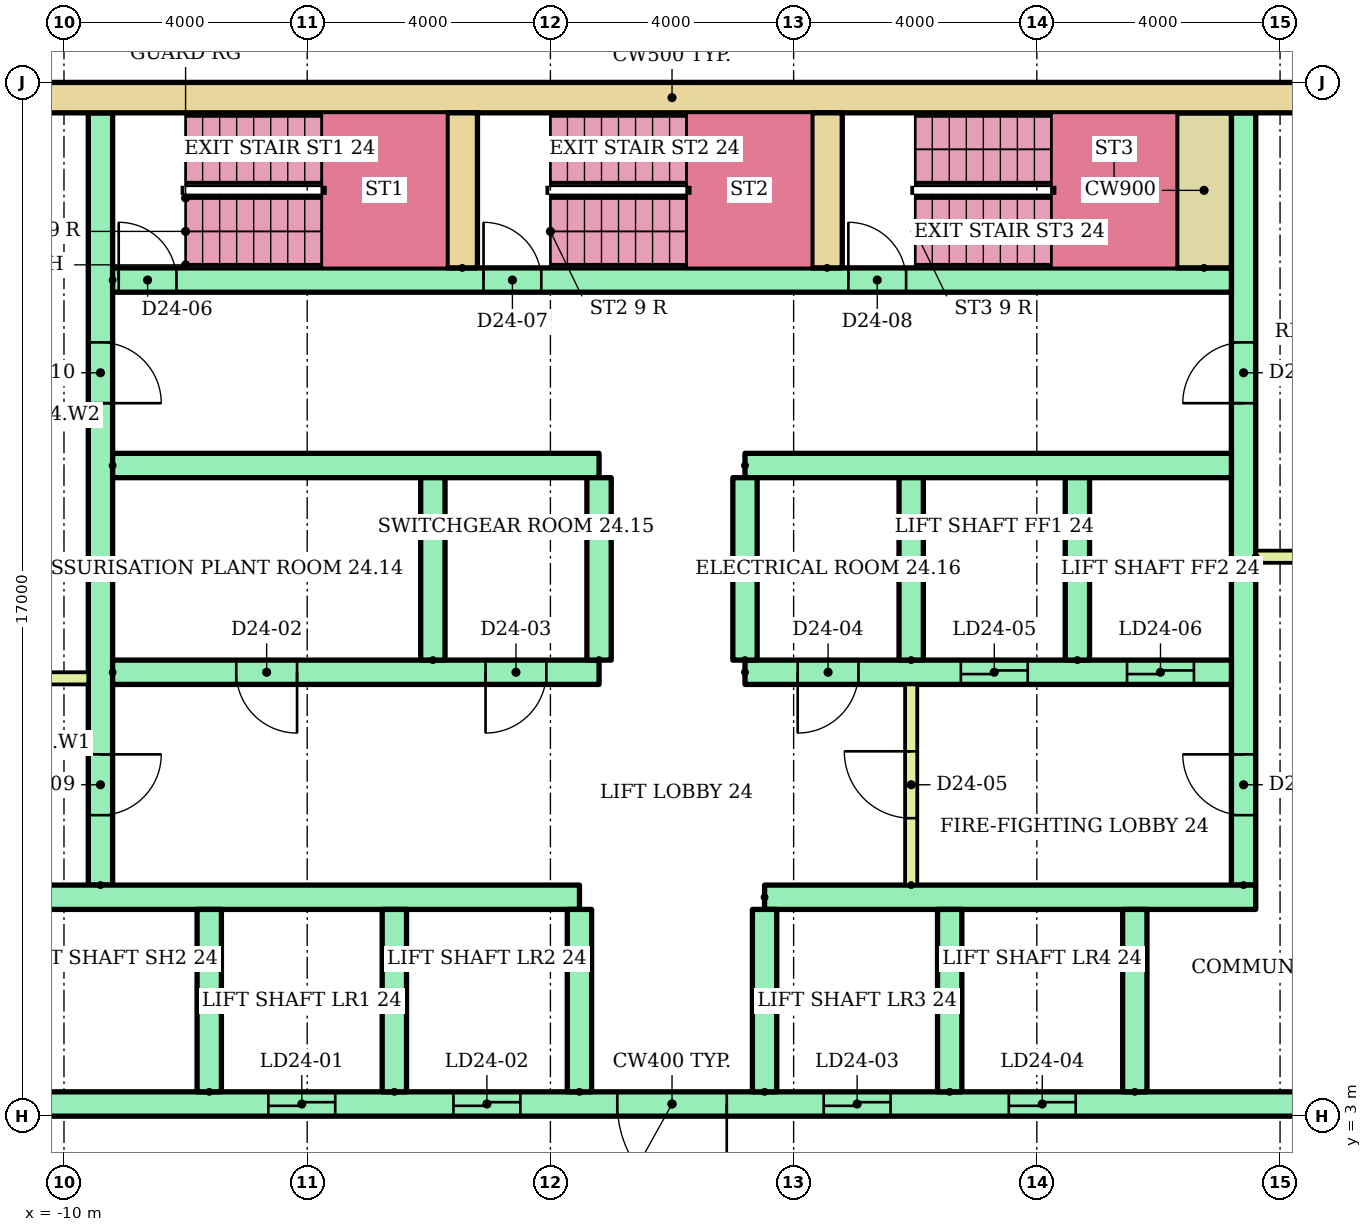
"""IFC4 building model, lengths in metres.
Left out: names, types, materials, properties, quantities, classifications, styles, units other than length and angle.
Written with IfcOpenShell. Run it as: python <this file> out.ifc"""

import sys

from ifc_helpers import new_model, si_unit, direction, frame, frame_2d, origin, place, context, subcontext, project, spatial, rectangle, extrude, element, fill, save


model = new_model("IFC4")
c1 = context("Model", 3, precision=1e-05, world=origin(), true_north=direction((0.0, 1.0)))
c2 = subcontext(c1, "Body", "Model", "MODEL_VIEW")
j1 = project(units=[si_unit("LENGTHUNIT", "METRE"), si_unit("PLANEANGLEUNIT", "RADIAN")], contexts=[c1])
p1 = place(None, origin())
s1 = spatial("IfcSite", under=j1, at=p1, CompositionType="ELEMENT")
p2 = place(p1, origin())
s2 = spatial("IfcBuilding", under=s1, at=p2, CompositionType="ELEMENT")
p3 = place(p2, frame((0.0, 0.0, 93.5)))
s3 = spatial("IfcBuildingStorey", under=s2, at=p3, CompositionType="ELEMENT", Elevation=93.5)
p4 = place(p3, frame((-13.5, 19.75, 0.0)))
e1 = element("IfcWall", 1, at=p4, inside=s3, PredefinedType="SHEAR", context=c2, shape_type="SweptSolid", body=[
    extrude(rectangle(XDim=27.0, YDim=0.5, at=frame_2d((13.5, 0.0))), origin(), (0.0, 0.0, 1.0), 2.92),
])
p5 = place(p3, frame((-9.4, 6.8, 0.0), z_axis=(0.0, 0.0, 1.0), x_axis=(0.0, 1.0, 0.0)))
e2 = element("IfcWall", 2, at=p5, inside=s3, PredefinedType="SHEAR", context=c2, shape_type="SweptSolid", body=[
    extrude(rectangle(XDim=12.7, YDim=0.4, at=frame_2d((6.35, 0.0))), origin(), (0.0, 0.0, 1.0), 2.92),
])
p6 = place(p5, frame((1.15, 0.0, 0.0)))
e3 = element("IfcOpeningElement", 3, at=p6, cuts=e2, PredefinedType="OPENING", context=c2, shape_type="SweptSolid", body=[
    extrude(rectangle(XDim=1.0, YDim=2.1, at=frame_2d((0.5, 1.05))), frame((0.0, 0.21, 0.0), z_axis=(0.0, -1.0, 0.0), x_axis=(1.0, 0.0, 0.0)), (0.0, 0.0, 1.0), 0.42),
])
p7 = place(p5, frame((7.925, 0.0, 0.0)))
e4 = element("IfcOpeningElement", 4, at=p7, cuts=e2, PredefinedType="OPENING", context=c2, shape_type="SweptSolid", body=[
    extrude(rectangle(XDim=1.0, YDim=2.1, at=frame_2d((0.5, 1.05))), frame((0.0, 0.21, 0.0), z_axis=(0.0, -1.0, 0.0), x_axis=(1.0, 0.0, 0.0)), (0.0, 0.0, 1.0), 0.42),
])
p8 = place(p3, frame((9.4, 6.8, 0.0), z_axis=(0.0, 0.0, 1.0), x_axis=(0.0, 1.0, 0.0)))
e5 = element("IfcWall", 5, at=p8, inside=s3, PredefinedType="SHEAR", context=c2, shape_type="SweptSolid", body=[
    extrude(rectangle(XDim=12.7, YDim=0.4, at=frame_2d((6.35, 0.0))), origin(), (0.0, 0.0, 1.0), 2.92),
])
p9 = place(p8, frame((1.15, 0.0, 0.0)))
e6 = element("IfcOpeningElement", 6, at=p9, cuts=e5, PredefinedType="OPENING", context=c2, shape_type="SweptSolid", body=[
    extrude(rectangle(XDim=1.0, YDim=2.1, at=frame_2d((0.5, 1.05))), frame((0.0, 0.21, 0.0), z_axis=(0.0, -1.0, 0.0), x_axis=(1.0, 0.0, 0.0)), (0.0, 0.0, 1.0), 0.42),
])
p10 = place(p8, frame((7.925, 0.0, 0.0)))
e7 = element("IfcOpeningElement", 7, at=p10, cuts=e5, PredefinedType="OPENING", context=c2, shape_type="SweptSolid", body=[
    extrude(rectangle(XDim=1.0, YDim=2.1, at=frame_2d((0.5, 1.05))), frame((0.0, 0.21, 0.0), z_axis=(0.0, -1.0, 0.0), x_axis=(1.0, 0.0, 0.0)), (0.0, 0.0, 1.0), 0.42),
])
p11 = place(p3, frame((-13.5, 3.2, 0.0)))
e8 = element("IfcWall", 8, at=p11, inside=s3, PredefinedType="SHEAR", context=c2, shape_type="SweptSolid", body=[
    extrude(rectangle(XDim=27.0, YDim=0.4, at=frame_2d((13.5, 0.0))), origin(), (0.0, 0.0, 1.0), 2.92),
])
p12 = place(p11, frame((6.861, 0.0, 0.0)))
e9 = element("IfcOpeningElement", 9, at=p12, cuts=e8, PredefinedType="OPENING", context=c2, shape_type="SweptSolid", body=[
    extrude(rectangle(XDim=1.1, YDim=2.1, at=frame_2d((0.55, 1.05))), frame((0.0, 0.21, 0.0), z_axis=(0.0, -1.0, 0.0), x_axis=(1.0, 0.0, 0.0)), (0.0, 0.0, 1.0), 0.42),
])
p13 = place(p11, frame((9.906, 0.0, 0.0)))
e10 = element("IfcOpeningElement", 10, at=p13, cuts=e8, PredefinedType="OPENING", context=c2, shape_type="SweptSolid", body=[
    extrude(rectangle(XDim=1.1, YDim=2.1, at=frame_2d((0.55, 1.05))), frame((0.0, 0.21, 0.0), z_axis=(0.0, -1.0, 0.0), x_axis=(1.0, 0.0, 0.0)), (0.0, 0.0, 1.0), 0.42),
])
p14 = place(p11, frame((15.994, 0.0, 0.0)))
e11 = element("IfcOpeningElement", 11, at=p14, cuts=e8, PredefinedType="OPENING", context=c2, shape_type="SweptSolid", body=[
    extrude(rectangle(XDim=1.1, YDim=2.1, at=frame_2d((0.55, 1.05))), frame((0.0, 0.21, 0.0), z_axis=(0.0, -1.0, 0.0), x_axis=(1.0, 0.0, 0.0)), (0.0, 0.0, 1.0), 0.42),
])
p15 = place(p11, frame((19.039, 0.0, 0.0)))
e12 = element("IfcOpeningElement", 12, at=p15, cuts=e8, PredefinedType="OPENING", context=c2, shape_type="SweptSolid", body=[
    extrude(rectangle(XDim=1.1, YDim=2.1, at=frame_2d((0.55, 1.05))), frame((0.0, 0.21, 0.0), z_axis=(0.0, -1.0, 0.0), x_axis=(1.0, 0.0, 0.0)), (0.0, 0.0, 1.0), 0.42),
])
p16 = place(p11, frame((12.6, 0.0, 0.0)))
e13 = element("IfcOpeningElement", 13, at=p16, cuts=e8, PredefinedType="OPENING", context=c2, shape_type="SweptSolid", body=[
    extrude(rectangle(XDim=1.8, YDim=2.1, at=frame_2d((0.9, 1.05))), frame((0.0, 0.21, 0.0), z_axis=(0.0, -1.0, 0.0), x_axis=(1.0, 0.0, 0.0)), (0.0, 0.0, 1.0), 0.42),
])
p17 = place(p3, frame((-13.5, 6.6, 0.0)))
e14 = element("IfcWall", 14, at=p17, inside=s3, PredefinedType="SHEAR", context=c2, shape_type="SweptSolid", body=[
    extrude(rectangle(XDim=11.978, YDim=0.4, at=frame_2d((5.989, 0.0))), origin(), (0.0, 0.0, 1.0), 2.92),
])
p18 = place(p3, frame((1.522, 6.6, 0.0)))
e15 = element("IfcWall", 15, at=p18, inside=s3, PredefinedType="SHEAR", context=c2, shape_type="SweptSolid", body=[
    extrude(rectangle(XDim=8.078, YDim=0.4, at=frame_2d((4.039, 0.0))), origin(), (0.0, 0.0, 1.0), 2.92),
])
for number, where, z_axis, x_axis in (
    (16, (-7.611, 3.4, 0.0), (0.0, 0.0, 1.0), (0.0, 1.0, 0.0)),
    (17, (-4.567, 3.4, 0.0), (0.0, 0.0, 1.0), (0.0, 1.0, 0.0)),
    (18, (-1.522, 3.4, 0.0), (0.0, 0.0, 1.0), (0.0, 1.0, 0.0)),
    (19, (1.522, 3.4, 0.0), (0.0, 0.0, 1.0), (0.0, 1.0, 0.0)),
    (20, (4.567, 3.4, 0.0), (0.0, 0.0, 1.0), (0.0, 1.0, 0.0)),
    (21, (7.611, 3.4, 0.0), (0.0, 0.0, 1.0), (0.0, 1.0, 0.0)),
):
    element("IfcWall", number, at=place(p3, frame(where, z_axis=z_axis, x_axis=x_axis)), inside=s3, PredefinedType="SHEAR", context=c2, shape_type="SweptSolid", body=[
        extrude(rectangle(XDim=3.0, YDim=0.4, at=frame_2d((1.5, 0.0))), origin(), (0.0, 0.0, 1.0), 2.92),
    ])
p19 = place(p3, frame((-9.2, 10.3, 0.0)))
e22 = element("IfcWall", 22, at=p19, inside=s3, PredefinedType="SHEAR", context=c2, shape_type="SweptSolid", body=[
    extrude(rectangle(XDim=8.0, YDim=0.4, at=frame_2d((4.0, 0.0))), origin(), (0.0, 0.0, 1.0), 2.92),
])
p20 = place(p19, frame((2.033, 0.0, 0.0)))
e23 = element("IfcOpeningElement", 23, at=p20, cuts=e22, PredefinedType="OPENING", context=c2, shape_type="SweptSolid", body=[
    extrude(rectangle(XDim=1.0, YDim=2.1, at=frame_2d((0.5, 1.05))), frame((0.0, 0.21, 0.0), z_axis=(0.0, -1.0, 0.0), x_axis=(1.0, 0.0, 0.0)), (0.0, 0.0, 1.0), 0.42),
])
p21 = place(p19, frame((6.133, 0.0, 0.0)))
e24 = element("IfcOpeningElement", 24, at=p21, cuts=e22, PredefinedType="OPENING", context=c2, shape_type="SweptSolid", body=[
    extrude(rectangle(XDim=1.0, YDim=2.1, at=frame_2d((0.5, 1.05))), frame((0.0, 0.21, 0.0), z_axis=(0.0, -1.0, 0.0), x_axis=(1.0, 0.0, 0.0)), (0.0, 0.0, 1.0), 0.42),
])
p22 = place(p3, frame((-9.2, 13.7, 0.0)))
e25 = element("IfcWall", 25, at=p22, inside=s3, PredefinedType="SHEAR", context=c2, shape_type="SweptSolid", body=[
    extrude(rectangle(XDim=8.0, YDim=0.4, at=frame_2d((4.0, 0.0))), origin(), (0.0, 0.0, 1.0), 2.92),
])
p23 = place(p3, frame((1.2, 10.3, 0.0)))
e26 = element("IfcWall", 26, at=p23, inside=s3, PredefinedType="SHEAR", context=c2, shape_type="SweptSolid", body=[
    extrude(rectangle(XDim=8.0, YDim=0.4, at=frame_2d((4.0, 0.0))), origin(), (0.0, 0.0, 1.0), 2.92),
])
p24 = place(p23, frame((3.55, 0.0, 0.0)))
e27 = element("IfcOpeningElement", 27, at=p24, cuts=e26, PredefinedType="OPENING", context=c2, shape_type="SweptSolid", body=[
    extrude(rectangle(XDim=1.1, YDim=2.1, at=frame_2d((0.55, 1.05))), frame((0.0, 0.21, 0.0), z_axis=(0.0, -1.0, 0.0), x_axis=(1.0, 0.0, 0.0)), (0.0, 0.0, 1.0), 0.42),
])
p25 = place(p23, frame((6.283, 0.0, 0.0)))
e28 = element("IfcOpeningElement", 28, at=p25, cuts=e26, PredefinedType="OPENING", context=c2, shape_type="SweptSolid", body=[
    extrude(rectangle(XDim=1.1, YDim=2.1, at=frame_2d((0.55, 1.05))), frame((0.0, 0.21, 0.0), z_axis=(0.0, -1.0, 0.0), x_axis=(1.0, 0.0, 0.0)), (0.0, 0.0, 1.0), 0.42),
])
p26 = place(p23, frame((0.867, 0.0, 0.0)))
e29 = element("IfcOpeningElement", 29, at=p26, cuts=e26, PredefinedType="OPENING", context=c2, shape_type="SweptSolid", body=[
    extrude(rectangle(XDim=1.0, YDim=2.1, at=frame_2d((0.5, 1.05))), frame((0.0, 0.21, 0.0), z_axis=(0.0, -1.0, 0.0), x_axis=(1.0, 0.0, 0.0)), (0.0, 0.0, 1.0), 0.42),
])
p27 = place(p3, frame((1.2, 13.7, 0.0)))
e30 = element("IfcWall", 30, at=p27, inside=s3, PredefinedType="SHEAR", context=c2, shape_type="SweptSolid", body=[
    extrude(rectangle(XDim=8.0, YDim=0.4, at=frame_2d((4.0, 0.0))), origin(), (0.0, 0.0, 1.0), 2.92),
])
for number, where, z_axis, x_axis in (
    (31, (-3.933, 10.5, 0.0), (0.0, 0.0, 1.0), (0.0, 1.0, 0.0)),
    (32, (-1.2, 10.5, 0.0), (0.0, 0.0, 1.0), (0.0, 1.0, 0.0)),
    (33, (1.2, 10.5, 0.0), (0.0, 0.0, 1.0), (0.0, 1.0, 0.0)),
    (34, (3.933, 10.5, 0.0), (0.0, 0.0, 1.0), (0.0, 1.0, 0.0)),
    (35, (6.667, 10.5, 0.0), (0.0, 0.0, 1.0), (0.0, 1.0, 0.0)),
):
    element("IfcWall", number, at=place(p3, frame(where, z_axis=z_axis, x_axis=x_axis)), inside=s3, PredefinedType="SHEAR", context=c2, shape_type="SweptSolid", body=[
        extrude(rectangle(XDim=3.0, YDim=0.4, at=frame_2d((1.5, 0.0))), origin(), (0.0, 0.0, 1.0), 2.92),
    ])
p28 = place(p3, frame((3.933, 6.8, 0.0), z_axis=(0.0, 0.0, 1.0), x_axis=(0.0, 1.0, 0.0)))
e36 = element("IfcWall", 36, at=p28, inside=s3, PredefinedType="PARTITIONING", context=c2, shape_type="SweptSolid", body=[
    extrude(rectangle(XDim=3.3, YDim=0.2, at=frame_2d((1.65, 0.0))), origin(), (0.0, 0.0, 1.0), 2.92),
])
p29 = place(p28, frame((1.1, 0.0, 0.0)))
e37 = element("IfcOpeningElement", 37, at=p29, cuts=e36, PredefinedType="OPENING", context=c2, shape_type="SweptSolid", body=[
    extrude(rectangle(XDim=1.1, YDim=2.1, at=frame_2d((0.55, 1.05))), frame((0.0, 0.11, 0.0), z_axis=(0.0, -1.0, 0.0), x_axis=(1.0, 0.0, 0.0)), (0.0, 0.0, 1.0), 0.22),
])
p30 = place(p3, frame((-9.2, 16.75, 0.0)))
e38 = element("IfcWall", 38, at=p30, inside=s3, PredefinedType="SHEAR", context=c2, shape_type="SweptSolid", body=[
    extrude(rectangle(XDim=18.4, YDim=0.4, at=frame_2d((9.2, 0.0))), origin(), (0.0, 0.0, 1.0), 2.92),
])
p31 = place(p30, frame((0.1, 0.0, 0.0)))
e39 = element("IfcOpeningElement", 39, at=p31, cuts=e38, PredefinedType="OPENING", context=c2, shape_type="SweptSolid", body=[
    extrude(rectangle(XDim=0.95, YDim=2.1, at=frame_2d((0.475, 1.05))), frame((0.0, 0.21, 0.0), z_axis=(0.0, -1.0, 0.0), x_axis=(1.0, 0.0, 0.0)), (0.0, 0.0, 1.0), 0.42),
])
p32 = place(p30, frame((6.1, 0.0, 0.0)))
e40 = element("IfcOpeningElement", 40, at=p32, cuts=e38, PredefinedType="OPENING", context=c2, shape_type="SweptSolid", body=[
    extrude(rectangle(XDim=0.95, YDim=2.1, at=frame_2d((0.475, 1.05))), frame((0.0, 0.21, 0.0), z_axis=(0.0, -1.0, 0.0), x_axis=(1.0, 0.0, 0.0)), (0.0, 0.0, 1.0), 0.42),
])
p33 = place(p30, frame((12.1, 0.0, 0.0)))
e41 = element("IfcOpeningElement", 41, at=p33, cuts=e38, PredefinedType="OPENING", context=c2, shape_type="SweptSolid", body=[
    extrude(rectangle(XDim=0.95, YDim=2.1, at=frame_2d((0.475, 1.05))), frame((0.0, 0.21, 0.0), z_axis=(0.0, -1.0, 0.0), x_axis=(1.0, 0.0, 0.0)), (0.0, 0.0, 1.0), 0.42),
])
for number, where, z_axis, x_axis in (
    (42, (-3.45, 16.95, 0.0), (0.0, 0.0, 1.0), (0.0, 1.0, 0.0)),
    (43, (2.55, 16.95, 0.0), (0.0, 0.0, 1.0), (0.0, 1.0, 0.0)),
):
    element("IfcWall", number, at=place(p3, frame(where, z_axis=z_axis, x_axis=x_axis)), inside=s3, PredefinedType="SHEAR", context=c2, shape_type="SweptSolid", body=[
        extrude(rectangle(XDim=2.55, YDim=0.5, at=frame_2d((1.275, 0.0))), origin(), (0.0, 0.0, 1.0), 2.92),
    ])
p34 = place(p3, frame((8.75, 16.95, 0.0), z_axis=(0.0, 0.0, 1.0), x_axis=(0.0, 1.0, 0.0)))
e44 = element("IfcWall", 44, at=p34, inside=s3, PredefinedType="SHEAR", context=c2, shape_type="SweptSolid", body=[
    extrude(rectangle(XDim=2.55, YDim=0.9, at=frame_2d((1.275, 0.0))), origin(), (0.0, 0.0, 1.0), 2.92),
])
for number, where in (
    (45, (-13.5, 10.2, 0.0)),
    (46, (9.6, 12.2, 0.0)),
):
    element("IfcWall", number, at=place(p3, frame(where)), inside=s3, PredefinedType="PARTITIONING", context=c2, shape_type="SweptSolid", body=[
        extrude(rectangle(XDim=3.9, YDim=0.2, at=frame_2d((1.95, 0.0))), origin(), (0.0, 0.0, 1.0), 2.92),
    ])
p35 = place(p12, origin())
e47 = element("IfcDoor", 47, at=p35, inside=s3, OperationType="SLIDING_TO_LEFT", PredefinedType="DOOR", context=c2, shape_type="SweptSolid", body=[
    extrude(rectangle(XDim=1.1, YDim=2.1, at=frame_2d((0.55, 1.05))), frame((0.0, 0.025, 0.0), z_axis=(0.0, -1.0, 0.0), x_axis=(1.0, 0.0, 0.0)), (0.0, 0.0, 1.0), 0.05),
])
fill(e9, e47)
p36 = place(p13, origin())
e48 = element("IfcDoor", 48, at=p36, inside=s3, OperationType="SLIDING_TO_LEFT", PredefinedType="DOOR", context=c2, shape_type="SweptSolid", body=[
    extrude(rectangle(XDim=1.1, YDim=2.1, at=frame_2d((0.55, 1.05))), frame((0.0, 0.025, 0.0), z_axis=(0.0, -1.0, 0.0), x_axis=(1.0, 0.0, 0.0)), (0.0, 0.0, 1.0), 0.05),
])
fill(e10, e48)
p37 = place(p14, origin())
e49 = element("IfcDoor", 49, at=p37, inside=s3, OperationType="SLIDING_TO_LEFT", PredefinedType="DOOR", context=c2, shape_type="SweptSolid", body=[
    extrude(rectangle(XDim=1.1, YDim=2.1, at=frame_2d((0.55, 1.05))), frame((0.0, 0.025, 0.0), z_axis=(0.0, -1.0, 0.0), x_axis=(1.0, 0.0, 0.0)), (0.0, 0.0, 1.0), 0.05),
])
fill(e11, e49)
p38 = place(p15, origin())
e50 = element("IfcDoor", 50, at=p38, inside=s3, OperationType="SLIDING_TO_LEFT", PredefinedType="DOOR", context=c2, shape_type="SweptSolid", body=[
    extrude(rectangle(XDim=1.1, YDim=2.1, at=frame_2d((0.55, 1.05))), frame((0.0, 0.025, 0.0), z_axis=(0.0, -1.0, 0.0), x_axis=(1.0, 0.0, 0.0)), (0.0, 0.0, 1.0), 0.05),
])
fill(e12, e50)
p39 = place(p16, frame((1.8, 0.0, 0.0), z_axis=(0.0, 0.0, 1.0), x_axis=(-1.0, 0.0, 0.0)))
e51 = element("IfcDoor", 51, at=p39, inside=s3, OperationType="DOUBLE_DOOR_SINGLE_SWING", PredefinedType="DOOR", context=c2, shape_type="SweptSolid", body=[
    extrude(rectangle(XDim=1.8, YDim=2.1, at=frame_2d((0.9, 1.05))), frame((0.0, 0.025, 0.0), z_axis=(0.0, -1.0, 0.0), x_axis=(1.0, 0.0, 0.0)), (0.0, 0.0, 1.0), 0.05),
])
fill(e13, e51)
p40 = place(p24, origin())
e52 = element("IfcDoor", 52, at=p40, inside=s3, OperationType="SLIDING_TO_LEFT", PredefinedType="DOOR", context=c2, shape_type="SweptSolid", body=[
    extrude(rectangle(XDim=1.1, YDim=2.1, at=frame_2d((0.55, 1.05))), frame((0.0, 0.025, 0.0), z_axis=(0.0, -1.0, 0.0), x_axis=(1.0, 0.0, 0.0)), (0.0, 0.0, 1.0), 0.05),
])
fill(e27, e52)
p41 = place(p25, origin())
e53 = element("IfcDoor", 53, at=p41, inside=s3, OperationType="SLIDING_TO_LEFT", PredefinedType="DOOR", context=c2, shape_type="SweptSolid", body=[
    extrude(rectangle(XDim=1.1, YDim=2.1, at=frame_2d((0.55, 1.05))), frame((0.0, 0.025, 0.0), z_axis=(0.0, -1.0, 0.0), x_axis=(1.0, 0.0, 0.0)), (0.0, 0.0, 1.0), 0.05),
])
fill(e28, e53)
p42 = place(p20, frame((1.0, 0.0, 0.0), z_axis=(0.0, 0.0, 1.0), x_axis=(-1.0, 0.0, 0.0)))
e54 = element("IfcDoor", 54, at=p42, inside=s3, OperationType="SINGLE_SWING_RIGHT", PredefinedType="DOOR", context=c2, shape_type="SweptSolid", body=[
    extrude(rectangle(XDim=1.0, YDim=2.1, at=frame_2d((0.5, 1.05))), frame((0.0, 0.025, 0.0), z_axis=(0.0, -1.0, 0.0), x_axis=(1.0, 0.0, 0.0)), (0.0, 0.0, 1.0), 0.05),
])
fill(e23, e54)
p43 = place(p21, frame((1.0, 0.0, 0.0), z_axis=(0.0, 0.0, 1.0), x_axis=(-1.0, 0.0, 0.0)))
e55 = element("IfcDoor", 55, at=p43, inside=s3, OperationType="SINGLE_SWING_LEFT", PredefinedType="DOOR", context=c2, shape_type="SweptSolid", body=[
    extrude(rectangle(XDim=1.0, YDim=2.1, at=frame_2d((0.5, 1.05))), frame((0.0, 0.025, 0.0), z_axis=(0.0, -1.0, 0.0), x_axis=(1.0, 0.0, 0.0)), (0.0, 0.0, 1.0), 0.05),
])
fill(e24, e55)
p44 = place(p26, frame((1.0, 0.0, 0.0), z_axis=(0.0, 0.0, 1.0), x_axis=(-1.0, 0.0, 0.0)))
e56 = element("IfcDoor", 56, at=p44, inside=s3, OperationType="SINGLE_SWING_LEFT", PredefinedType="DOOR", context=c2, shape_type="SweptSolid", body=[
    extrude(rectangle(XDim=1.0, YDim=2.1, at=frame_2d((0.5, 1.05))), frame((0.0, 0.025, 0.0), z_axis=(0.0, -1.0, 0.0), x_axis=(1.0, 0.0, 0.0)), (0.0, 0.0, 1.0), 0.05),
])
fill(e29, e56)
p45 = place(p29, origin())
e57 = element("IfcDoor", 57, at=p45, inside=s3, OperationType="SINGLE_SWING_RIGHT", PredefinedType="DOOR", context=c2, shape_type="SweptSolid", body=[
    extrude(rectangle(XDim=1.1, YDim=2.1, at=frame_2d((0.55, 1.05))), frame((0.0, 0.025, 0.0), z_axis=(0.0, -1.0, 0.0), x_axis=(1.0, 0.0, 0.0)), (0.0, 0.0, 1.0), 0.05),
])
fill(e37, e57)
p46 = place(p31, origin())
e58 = element("IfcDoor", 58, at=p46, inside=s3, OperationType="SINGLE_SWING_LEFT", PredefinedType="DOOR", context=c2, shape_type="SweptSolid", body=[
    extrude(rectangle(XDim=0.95, YDim=2.1, at=frame_2d((0.475, 1.05))), frame((0.0, 0.025, 0.0), z_axis=(0.0, -1.0, 0.0), x_axis=(1.0, 0.0, 0.0)), (0.0, 0.0, 1.0), 0.05),
])
fill(e39, e58)
p47 = place(p32, origin())
e59 = element("IfcDoor", 59, at=p47, inside=s3, OperationType="SINGLE_SWING_LEFT", PredefinedType="DOOR", context=c2, shape_type="SweptSolid", body=[
    extrude(rectangle(XDim=0.95, YDim=2.1, at=frame_2d((0.475, 1.05))), frame((0.0, 0.025, 0.0), z_axis=(0.0, -1.0, 0.0), x_axis=(1.0, 0.0, 0.0)), (0.0, 0.0, 1.0), 0.05),
])
fill(e40, e59)
p48 = place(p33, origin())
e60 = element("IfcDoor", 60, at=p48, inside=s3, OperationType="SINGLE_SWING_LEFT", PredefinedType="DOOR", context=c2, shape_type="SweptSolid", body=[
    extrude(rectangle(XDim=0.95, YDim=2.1, at=frame_2d((0.475, 1.05))), frame((0.0, 0.025, 0.0), z_axis=(0.0, -1.0, 0.0), x_axis=(1.0, 0.0, 0.0)), (0.0, 0.0, 1.0), 0.05),
])
fill(e41, e60)
p49 = place(p6, frame((1.0, 0.0, 0.0), z_axis=(0.0, 0.0, 1.0), x_axis=(-1.0, 0.0, 0.0)))
e61 = element("IfcDoor", 61, at=p49, inside=s3, OperationType="SINGLE_SWING_RIGHT", PredefinedType="DOOR", context=c2, shape_type="SweptSolid", body=[
    extrude(rectangle(XDim=1.0, YDim=2.1, at=frame_2d((0.5, 1.05))), frame((0.0, 0.025, 0.0), z_axis=(0.0, -1.0, 0.0), x_axis=(1.0, 0.0, 0.0)), (0.0, 0.0, 1.0), 0.05),
])
fill(e3, e61)
p50 = place(p7, frame((1.0, 0.0, 0.0), z_axis=(0.0, 0.0, 1.0), x_axis=(-1.0, 0.0, 0.0)))
e62 = element("IfcDoor", 62, at=p50, inside=s3, OperationType="SINGLE_SWING_LEFT", PredefinedType="DOOR", context=c2, shape_type="SweptSolid", body=[
    extrude(rectangle(XDim=1.0, YDim=2.1, at=frame_2d((0.5, 1.05))), frame((0.0, 0.025, 0.0), z_axis=(0.0, -1.0, 0.0), x_axis=(1.0, 0.0, 0.0)), (0.0, 0.0, 1.0), 0.05),
])
fill(e4, e62)
p51 = place(p9, origin())
e63 = element("IfcDoor", 63, at=p51, inside=s3, OperationType="SINGLE_SWING_RIGHT", PredefinedType="DOOR", context=c2, shape_type="SweptSolid", body=[
    extrude(rectangle(XDim=1.0, YDim=2.1, at=frame_2d((0.5, 1.05))), frame((0.0, 0.025, 0.0), z_axis=(0.0, -1.0, 0.0), x_axis=(1.0, 0.0, 0.0)), (0.0, 0.0, 1.0), 0.05),
])
fill(e6, e63)
p52 = place(p10, origin())
e64 = element("IfcDoor", 64, at=p52, inside=s3, OperationType="SINGLE_SWING_LEFT", PredefinedType="DOOR", context=c2, shape_type="SweptSolid", body=[
    extrude(rectangle(XDim=1.0, YDim=2.1, at=frame_2d((0.5, 1.05))), frame((0.0, 0.025, 0.0), z_axis=(0.0, -1.0, 0.0), x_axis=(1.0, 0.0, 0.0)), (0.0, 0.0, 1.0), 0.05),
])
fill(e7, e64)
save(model, sys.argv[1])
